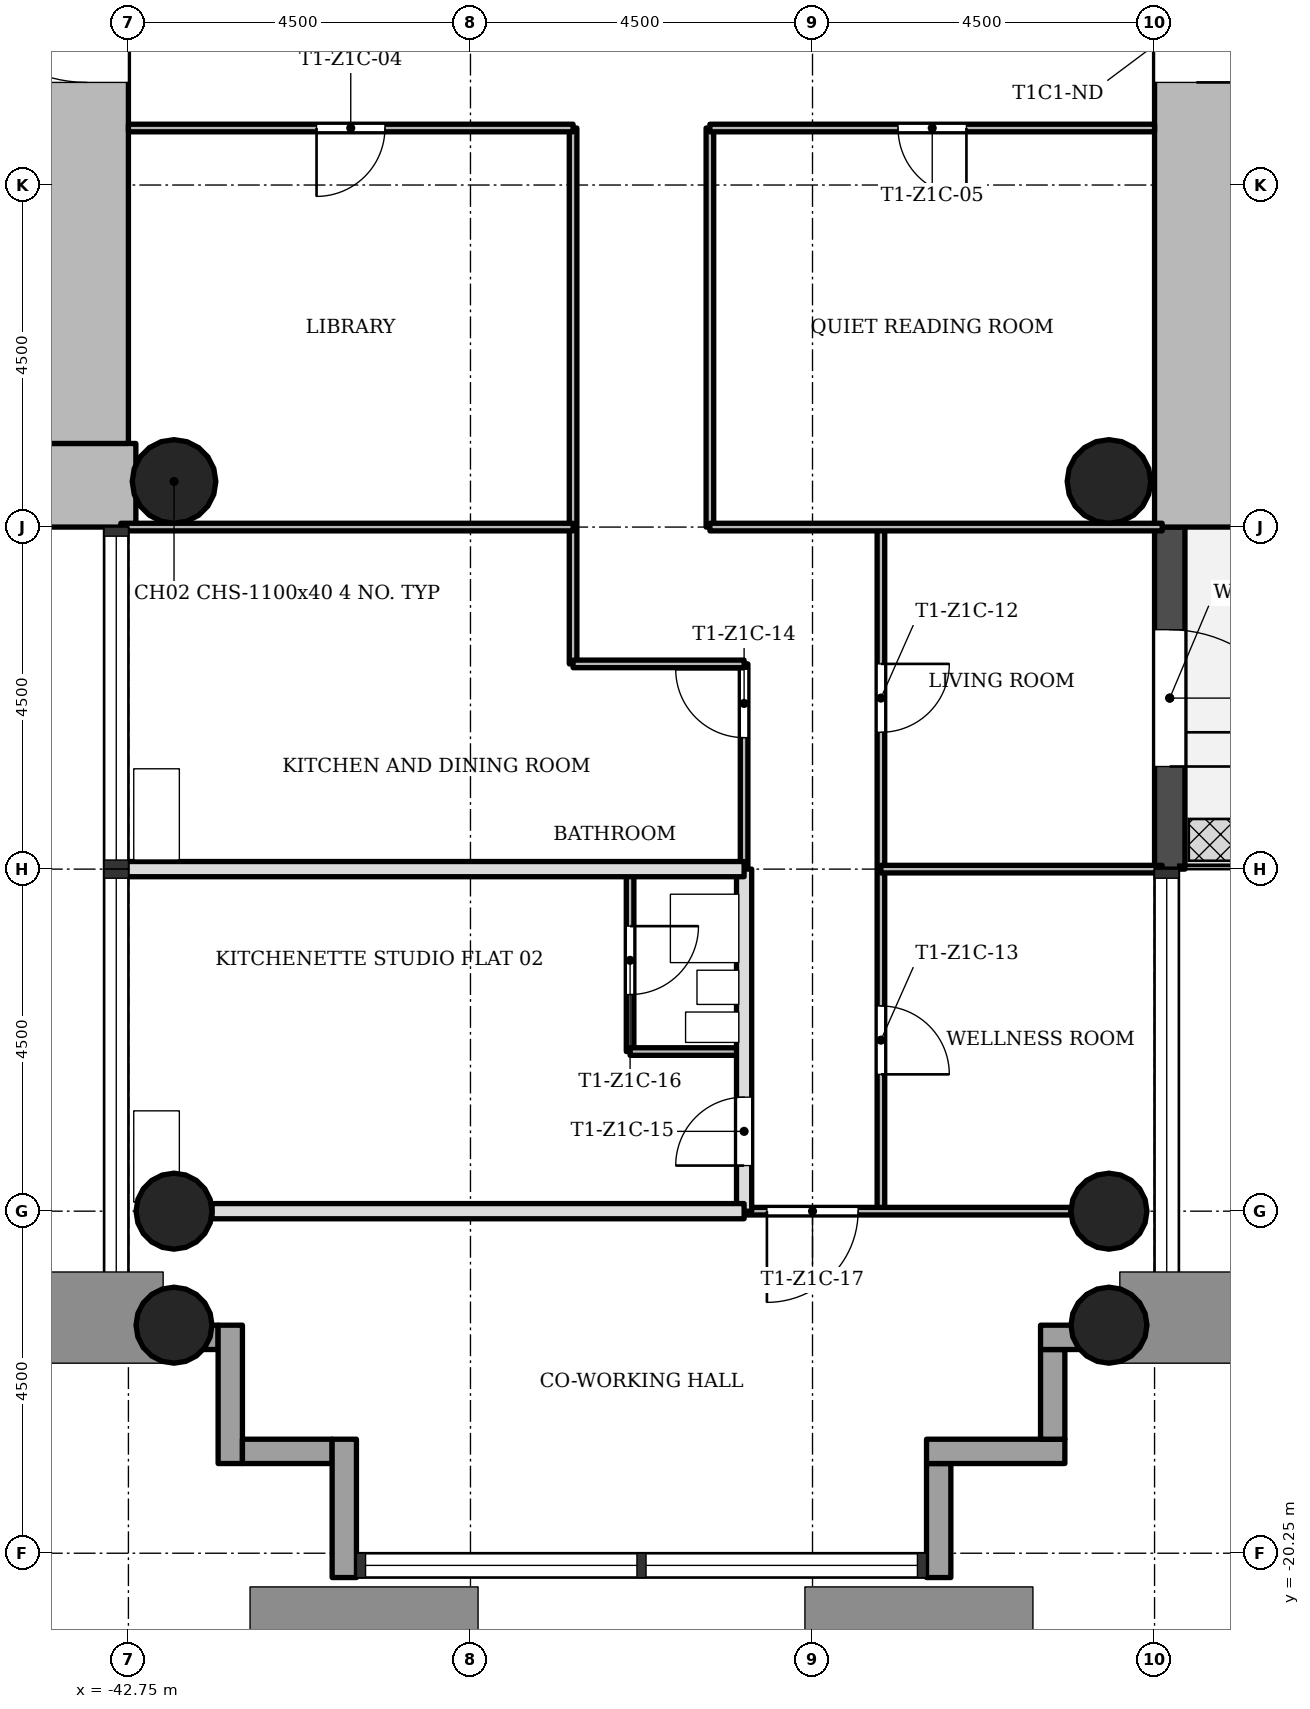
"""IFC4 building model, lengths in metres.
Left out: names, types, materials, properties, quantities, classifications, styles, units other than length and angle.
Written with IfcOpenShell. Run it as: python <this file> out.ifc"""

import sys

from ifc_helpers import new_model, si_unit, direction, frame, frame_2d, origin, origin_2d, place, context, subcontext, project, spatial, rectangle, hollow_circle, extrude, element, fill, save


model = new_model("IFC4")
c1 = context("Model", 3, precision=1e-05, world=origin(), true_north=direction((0.0, 1.0)))
c2 = subcontext(c1, "Body", "Model", "MODEL_VIEW")
j1 = project(units=[si_unit("LENGTHUNIT", "METRE"), si_unit("PLANEANGLEUNIT", "RADIAN")], contexts=[c1])
p1 = place(None, origin())
s1 = spatial("IfcSite", under=j1, at=p1, CompositionType="ELEMENT")
p2 = place(p1, origin())
s2 = spatial("IfcBuilding", under=s1, at=p2, CompositionType="ELEMENT")
p3 = place(p2, frame((0.0, 0.0, 44.9)))
s3 = spatial("IfcBuildingStorey", under=s2, at=p3, CompositionType="ELEMENT", Elevation=44.9)
p4 = place(p3, frame((-28.7, 5.65, 0.0), z_axis=(0.0, 0.0, 1.0), x_axis=(0.0, -1.0, 0.0)))
e1 = element("IfcWall", 1, at=p4, inside=s3, PredefinedType="SHEAR", context=c2, shape_type="SweptSolid", body=[
    extrude(rectangle(XDim=12.4, YDim=1.1, at=frame_2d((6.2, 0.0))), origin(), (0.0, 0.0, 1.0), 3.4),
])
p5 = place(p4, frame((4.75, 0.0, 0.0)))
e2 = element("IfcOpeningElement", 2, at=p5, cuts=e1, PredefinedType="OPENING", context=c2, shape_type="SweptSolid", body=[
    extrude(rectangle(XDim=1.8, YDim=2.1, at=frame_2d((0.9, 1.05))), frame((0.0, 0.56, 0.0), z_axis=(0.0, -1.0, 0.0), x_axis=(1.0, 0.0, 0.0)), (0.0, 0.0, 1.0), 1.12),
])
p6 = place(p3, frame((-50.65, -6.2, 0.0), z_axis=(0.0, 0.0, 1.0), x_axis=(1.0, 0.0, 0.0)))
e3 = element("IfcWall", 3, at=p6, inside=s3, PredefinedType="SHEAR", context=c2, shape_type="SweptSolid", body=[
    extrude(rectangle(XDim=7.998, YDim=1.1, at=frame_2d((3.999, 0.0))), origin(), (0.0, 0.0, 1.0), 3.4),
])
p7 = place(p3, frame((-43.3, -5.65, 0.0), z_axis=(0.0, 0.0, 1.0), x_axis=(0.0, 1.0, 0.0)))
e4 = element("IfcWall", 4, at=p7, inside=s3, PredefinedType="SHEAR", context=c2, shape_type="SweptSolid", body=[
    extrude(rectangle(XDim=12.4, YDim=1.1, at=frame_2d((6.2, 0.0))), origin(), (0.0, 0.0, 1.0), 3.4),
])
p8 = place(p7, frame((4.75, 0.0, 0.0)))
e5 = element("IfcOpeningElement", 5, at=p8, cuts=e4, PredefinedType="OPENING", context=c2, shape_type="SweptSolid", body=[
    extrude(rectangle(XDim=1.8, YDim=2.1, at=frame_2d((0.9, 1.05))), frame((0.0, 0.56, 0.0), z_axis=(0.0, -1.0, 0.0), x_axis=(1.0, 0.0, 0.0)), (0.0, 0.0, 1.0), 1.12),
])
for number, where, z_axis, x_axis in (
    (6, (-42.15, -15.75, 0.0), (0.0, 0.0, 1.0), (1.0, 0.0, 0.0)),
    (7, (-29.85, -15.75, 0.0), (0.0, 0.0, 1.0), (1.0, 0.0, 0.0)),
    (8, (-42.15, -17.25, 0.0), (0.0, 0.0, 1.0), (1.0, 0.0, 0.0)),
    (9, (-29.85, -17.25, 0.0), (0.0, 0.0, 1.0), (1.0, 0.0, 0.0)),
):
    element("IfcColumn", number, at=place(p3, frame(where, z_axis=z_axis, x_axis=x_axis)), inside=s3, PredefinedType="COLUMN", context=c2, shape_type="SweptSolid", body=[
        extrude(hollow_circle(Radius=0.5, WallThickness=0.036, at=origin_2d()), origin(), (0.0, 0.0, 1.0), 3.4),
    ])
for number, where, z_axis, x_axis in (
    (10, (-42.15, -6.15, 0.0), (0.0, 0.0, 1.0), (1.0, 0.0, 0.0)),
    (11, (-29.85, -6.15, 0.0), (0.0, 0.0, 1.0), (1.0, 0.0, 0.0)),
):
    element("IfcColumn", number, at=place(p3, frame(where, z_axis=z_axis, x_axis=x_axis)), inside=s3, PredefinedType="COLUMN", context=c2, shape_type="SweptSolid", body=[
        extrude(hollow_circle(Radius=0.55, WallThickness=0.04, at=origin_2d()), origin(), (0.0, 0.0, 1.0), 3.4),
    ])
p9 = place(p3, frame((-43.07, -17.41, -0.3), z_axis=(0.0, 0.0, 1.0), x_axis=(1.0, 0.0, 0.0)))
e12 = element("IfcWall", 12, at=p9, inside=s3, PredefinedType="STANDARD", context=c2, shape_type="SweptSolid", body=[
    extrude(rectangle(XDim=1.5, YDim=0.32, at=frame_2d((0.75, 0.0))), origin(), (0.0, 0.0, 1.0), 3.4),
])
p10 = place(p3, frame((-41.41, -17.25, -0.3), z_axis=(0.0, 0.0, 1.0), x_axis=(0.0, -1.0, 0.0)))
e13 = element("IfcWall", 13, at=p10, inside=s3, PredefinedType="STANDARD", context=c2, shape_type="SweptSolid", body=[
    extrude(rectangle(XDim=1.82, YDim=0.32, at=frame_2d((0.91, 0.0))), origin(), (0.0, 0.0, 1.0), 3.4),
])
p11 = place(p3, frame((-41.25, -18.91, -0.3), z_axis=(0.0, 0.0, 1.0), x_axis=(1.0, 0.0, 0.0)))
e14 = element("IfcWall", 14, at=p11, inside=s3, PredefinedType="STANDARD", context=c2, shape_type="SweptSolid", body=[
    extrude(rectangle(XDim=1.18, YDim=0.32, at=frame_2d((0.59, 0.0))), origin(), (0.0, 0.0, 1.0), 3.4),
])
p12 = place(p3, frame((-39.91, -18.75, -0.3), z_axis=(0.0, 0.0, 1.0), x_axis=(0.0, -1.0, 0.0)))
e15 = element("IfcWall", 15, at=p12, inside=s3, PredefinedType="STANDARD", context=c2, shape_type="SweptSolid", body=[
    extrude(rectangle(XDim=1.82, YDim=0.32, at=frame_2d((0.91, 0.0))), origin(), (0.0, 0.0, 1.0), 3.4),
])
p13 = place(p3, frame((-32.09, -20.57, -0.3), z_axis=(0.0, 0.0, 1.0), x_axis=(0.0, 1.0, 0.0)))
e16 = element("IfcWall", 16, at=p13, inside=s3, PredefinedType="STANDARD", context=c2, shape_type="SweptSolid", body=[
    extrude(rectangle(XDim=1.5, YDim=0.32, at=frame_2d((0.75, 0.0))), origin(), (0.0, 0.0, 1.0), 3.4),
])
p14 = place(p3, frame((-32.25, -18.91, -0.3), z_axis=(0.0, 0.0, 1.0), x_axis=(1.0, 0.0, 0.0)))
e17 = element("IfcWall", 17, at=p14, inside=s3, PredefinedType="STANDARD", context=c2, shape_type="SweptSolid", body=[
    extrude(rectangle(XDim=1.82, YDim=0.32, at=frame_2d((0.91, 0.0))), origin(), (0.0, 0.0, 1.0), 3.4),
])
p15 = place(p3, frame((-30.59, -18.75, -0.3), z_axis=(0.0, 0.0, 1.0), x_axis=(0.0, 1.0, 0.0)))
e18 = element("IfcWall", 18, at=p15, inside=s3, PredefinedType="STANDARD", context=c2, shape_type="SweptSolid", body=[
    extrude(rectangle(XDim=1.18, YDim=0.32, at=frame_2d((0.59, 0.0))), origin(), (0.0, 0.0, 1.0), 3.4),
])
p16 = place(p3, frame((-30.75, -17.41, -0.3), z_axis=(0.0, 0.0, 1.0), x_axis=(1.0, 0.0, 0.0)))
e19 = element("IfcWall", 19, at=p16, inside=s3, PredefinedType="STANDARD", context=c2, shape_type="SweptSolid", body=[
    extrude(rectangle(XDim=1.82, YDim=0.32, at=frame_2d((0.91, 0.0))), origin(), (0.0, 0.0, 1.0), 3.4),
])
p17 = place(p3, frame((-29.05, -11.25, -0.02), z_axis=(0.0, 0.0, 1.0), x_axis=(0.0, 1.0, 0.0)))
e20 = element("IfcWall", 20, at=p17, inside=s3, PredefinedType="STANDARD", context=c2, shape_type="SweptSolid", body=[
    extrude(rectangle(XDim=4.5, YDim=0.4, at=frame_2d((2.25, 0.0))), origin(), (0.0, 0.0, 1.0), 3.12),
])
p18 = place(p17, frame((1.35, 0.0, 0.02)))
e21 = element("IfcOpeningElement", 21, at=p18, cuts=e20, PredefinedType="OPENING", context=c2, shape_type="SweptSolid", body=[
    extrude(rectangle(XDim=1.8, YDim=2.1, at=frame_2d((0.9, 1.05))), frame((0.0, 0.21, 0.0), z_axis=(0.0, -1.0, 0.0), x_axis=(1.0, 0.0, 0.0)), (0.0, 0.0, 1.0), 0.42),
])
p19 = place(p3, frame((-36.9, -8.55, 0.0), z_axis=(0.0, 0.0, 1.0), x_axis=(0.0, 1.0, 0.0)))
e22 = element("IfcWall", 22, at=p19, inside=s3, PredefinedType="PARTITIONING", context=c2, shape_type="SweptSolid", body=[
    extrude(rectangle(XDim=7.05, YDim=0.1, at=frame_2d((3.525, 0.0))), origin(), (0.0, 0.0, 1.0), 3.0),
])
p20 = place(p3, frame((-36.15, -13.65, 0.0), z_axis=(0.0, 0.0, 1.0), x_axis=(0.0, 1.0, 0.0)))
e23 = element("IfcWall", 23, at=p20, inside=s3, PredefinedType="PARTITIONING", context=c2, shape_type="SweptSolid", body=[
    extrude(rectangle(XDim=2.4, YDim=0.1, at=frame_2d((1.2, 0.0))), origin(), (0.0, 0.0, 1.0), 3.0),
])
p21 = place(p20, frame((0.75, 0.0, 0.0)))
e24 = element("IfcOpeningElement", 24, at=p21, cuts=e23, PredefinedType="OPENING", context=c2, shape_type="SweptSolid", body=[
    extrude(rectangle(XDim=0.9, YDim=2.1, at=frame_2d((0.45, 1.05))), frame((0.0, 0.06, 0.0), z_axis=(0.0, -1.0, 0.0), x_axis=(1.0, 0.0, 0.0)), (0.0, 0.0, 1.0), 0.12),
])
p22 = place(p3, frame((-35.1, -6.75, 0.0), z_axis=(0.0, 0.0, 1.0), x_axis=(0.0, 1.0, 0.0)))
e25 = element("IfcWall", 25, at=p22, inside=s3, PredefinedType="PARTITIONING", context=c2, shape_type="SweptSolid", body=[
    extrude(rectangle(XDim=5.25, YDim=0.1, at=frame_2d((2.625, 0.0))), origin(), (0.0, 0.0, 1.0), 3.0),
])
p23 = place(p3, frame((-34.65, -11.25, 0.0), z_axis=(0.0, 0.0, 1.0), x_axis=(0.0, 1.0, 0.0)))
e26 = element("IfcWall", 26, at=p23, inside=s3, PredefinedType="PARTITIONING", context=c2, shape_type="SweptSolid", body=[
    extrude(rectangle(XDim=2.7, YDim=0.1, at=frame_2d((1.35, 0.0))), origin(), (0.0, 0.0, 1.0), 3.0),
])
p24 = place(p23, frame((1.73, 0.0, 0.0)))
e27 = element("IfcOpeningElement", 27, at=p24, cuts=e26, PredefinedType="OPENING", context=c2, shape_type="SweptSolid", body=[
    extrude(rectangle(XDim=0.9, YDim=2.1, at=frame_2d((0.45, 1.05))), frame((0.0, 0.06, 0.0), z_axis=(0.0, -1.0, 0.0), x_axis=(1.0, 0.0, 0.0)), (0.0, 0.0, 1.0), 0.12),
])
p25 = place(p3, frame((-34.65, -15.75, 0.0), z_axis=(0.0, 0.0, 1.0), x_axis=(0.0, 1.0, 0.0)))
e28 = element("IfcWall", 28, at=p25, inside=s3, PredefinedType="SOLIDWALL", context=c2, shape_type="SweptSolid", body=[
    extrude(rectangle(XDim=4.5, YDim=0.2, at=frame_2d((2.25, 0.0))), origin(), (0.0, 0.0, 1.0), 3.0),
])
p26 = place(p25, frame((0.6, 0.0, 0.0)))
e29 = element("IfcOpeningElement", 29, at=p26, cuts=e28, PredefinedType="OPENING", context=c2, shape_type="SweptSolid", body=[
    extrude(rectangle(XDim=0.9, YDim=2.1, at=frame_2d((0.45, 1.05))), frame((0.0, 0.11, 0.0), z_axis=(0.0, -1.0, 0.0), x_axis=(1.0, 0.0, 0.0)), (0.0, 0.0, 1.0), 0.22),
])
p27 = place(p3, frame((-32.85, -15.75, 0.0), z_axis=(0.0, 0.0, 1.0), x_axis=(0.0, 1.0, 0.0)))
e30 = element("IfcWall", 30, at=p27, inside=s3, PredefinedType="PARTITIONING", context=c2, shape_type="SweptSolid", body=[
    extrude(rectangle(XDim=9.0, YDim=0.1, at=frame_2d((4.5, 0.0))), origin(), (0.0, 0.0, 1.0), 3.0),
])
p28 = place(p27, frame((6.3, 0.0, 0.0)))
e31 = element("IfcOpeningElement", 31, at=p28, cuts=e30, PredefinedType="OPENING", context=c2, shape_type="SweptSolid", body=[
    extrude(rectangle(XDim=0.9, YDim=2.1, at=frame_2d((0.45, 1.05))), frame((0.0, 0.06, 0.0), z_axis=(0.0, -1.0, 0.0), x_axis=(1.0, 0.0, 0.0)), (0.0, 0.0, 1.0), 0.12),
])
p29 = place(p27, frame((1.8, 0.0, 0.0)))
e32 = element("IfcOpeningElement", 32, at=p29, cuts=e30, PredefinedType="OPENING", context=c2, shape_type="SweptSolid", body=[
    extrude(rectangle(XDim=0.9, YDim=2.1, at=frame_2d((0.45, 1.05))), frame((0.0, 0.06, 0.0), z_axis=(0.0, -1.0, 0.0), x_axis=(1.0, 0.0, 0.0)), (0.0, 0.0, 1.0), 0.12),
])
p30 = place(p3, frame((-34.65, -15.75, 0.0), z_axis=(0.0, 0.0, 1.0), x_axis=(1.0, 0.0, 0.0)))
e33 = element("IfcWall", 33, at=p30, inside=s3, PredefinedType="PARTITIONING", context=c2, shape_type="SweptSolid", body=[
    extrude(rectangle(XDim=4.3, YDim=0.1, at=frame_2d((2.15, 0.0))), origin(), (0.0, 0.0, 1.0), 3.0),
])
p31 = place(p30, frame((0.3, 0.0, 0.0)))
e34 = element("IfcOpeningElement", 34, at=p31, cuts=e33, PredefinedType="OPENING", context=c2, shape_type="SweptSolid", body=[
    extrude(rectangle(XDim=1.2, YDim=2.1, at=frame_2d((0.6, 1.05))), frame((0.0, 0.06, 0.0), z_axis=(0.0, -1.0, 0.0), x_axis=(1.0, 0.0, 0.0)), (0.0, 0.0, 1.0), 0.12),
])
p32 = place(p3, frame((-41.65, -15.75, 0.0), z_axis=(0.0, 0.0, 1.0), x_axis=(1.0, 0.0, 0.0)))
e35 = element("IfcWall", 35, at=p32, inside=s3, PredefinedType="SOLIDWALL", context=c2, shape_type="SweptSolid", body=[
    extrude(rectangle(XDim=7.0, YDim=0.2, at=frame_2d((3.5, 0.0))), origin(), (0.0, 0.0, 1.0), 3.0),
])
p33 = place(p3, frame((-36.15, -13.65, 0.0), z_axis=(0.0, 0.0, 1.0), x_axis=(1.0, 0.0, 0.0)))
e36 = element("IfcWall", 36, at=p33, inside=s3, PredefinedType="PARTITIONING", context=c2, shape_type="SweptSolid", body=[
    extrude(rectangle(XDim=1.5, YDim=0.1, at=frame_2d((0.75, 0.0))), origin(), (0.0, 0.0, 1.0), 3.0),
])
p34 = place(p3, frame((-32.85, -11.25, 0.0), z_axis=(0.0, 0.0, 1.0), x_axis=(1.0, 0.0, 0.0)))
e37 = element("IfcWall", 37, at=p34, inside=s3, PredefinedType="PARTITIONING", context=c2, shape_type="SweptSolid", body=[
    extrude(rectangle(XDim=3.7, YDim=0.1, at=frame_2d((1.85, 0.0))), origin(), (0.0, 0.0, 1.0), 3.0),
])
p35 = place(p3, frame((-42.85, -11.25, 0.0), z_axis=(0.0, 0.0, 1.0), x_axis=(1.0, 0.0, 0.0)))
e38 = element("IfcWall", 38, at=p35, inside=s3, PredefinedType="SOLIDWALL", context=c2, shape_type="SweptSolid", body=[
    extrude(rectangle(XDim=8.2, YDim=0.2, at=frame_2d((4.1, 0.0))), origin(), (0.0, 0.0, 1.0), 3.0),
])
p36 = place(p3, frame((-36.9, -8.55, 0.0), z_axis=(0.0, 0.0, 1.0), x_axis=(1.0, 0.0, 0.0)))
e39 = element("IfcWall", 39, at=p36, inside=s3, PredefinedType="PARTITIONING", context=c2, shape_type="SweptSolid", body=[
    extrude(rectangle(XDim=2.25, YDim=0.1, at=frame_2d((1.125, 0.0))), origin(), (0.0, 0.0, 1.0), 3.0),
])
for number, where, z_axis, x_axis in (
    (40, (-42.85, -6.75, 0.0), (0.0, 0.0, 1.0), (1.0, 0.0, 0.0)),
    (41, (-35.1, -6.75, 0.0), (0.0, 0.0, 1.0), (1.0, 0.0, 0.0)),
):
    element("IfcWall", number, at=place(p3, frame(where, z_axis=z_axis, x_axis=x_axis)), inside=s3, PredefinedType="PARTITIONING", context=c2, shape_type="SweptSolid", body=[
        extrude(rectangle(XDim=5.95, YDim=0.1, at=frame_2d((2.975, 0.0))), origin(), (0.0, 0.0, 1.0), 3.0),
    ])
p37 = place(p3, frame((-42.75, -1.5, 0.0), z_axis=(0.0, 0.0, 1.0), x_axis=(1.0, 0.0, 0.0)))
e42 = element("IfcWall", 42, at=p37, inside=s3, PredefinedType="PARTITIONING", context=c2, shape_type="SweptSolid", body=[
    extrude(rectangle(XDim=5.85, YDim=0.1, at=frame_2d((2.925, 0.0))), origin(), (0.0, 0.0, 1.0), 3.0),
])
p38 = place(p37, frame((2.475, 0.0, 0.0)))
e43 = element("IfcOpeningElement", 43, at=p38, cuts=e42, PredefinedType="OPENING", context=c2, shape_type="SweptSolid", body=[
    extrude(rectangle(XDim=0.9, YDim=2.1, at=frame_2d((0.45, 1.05))), frame((0.0, 0.06, 0.0), z_axis=(0.0, -1.0, 0.0), x_axis=(1.0, 0.0, 0.0)), (0.0, 0.0, 1.0), 0.12),
])
p39 = place(p3, frame((-35.1, -1.5, 0.0), z_axis=(0.0, 0.0, 1.0), x_axis=(1.0, 0.0, 0.0)))
e44 = element("IfcWall", 44, at=p39, inside=s3, PredefinedType="PARTITIONING", context=c2, shape_type="SweptSolid", body=[
    extrude(rectangle(XDim=5.85, YDim=0.1, at=frame_2d((2.925, 0.0))), origin(), (0.0, 0.0, 1.0), 3.0),
])
p40 = place(p39, frame((2.475, 0.0, 0.0)))
e45 = element("IfcOpeningElement", 45, at=p40, cuts=e44, PredefinedType="OPENING", context=c2, shape_type="SweptSolid", body=[
    extrude(rectangle(XDim=0.9, YDim=2.1, at=frame_2d((0.45, 1.05))), frame((0.0, 0.06, 0.0), z_axis=(0.0, -1.0, 0.0), x_axis=(1.0, 0.0, 0.0)), (0.0, 0.0, 1.0), 0.12),
])
p41 = place(p18, origin())
e46 = element("IfcDoor", 46, at=p41, inside=s3, OperationType="SINGLE_SWING_LEFT", PredefinedType="DOOR", context=c2, shape_type="SweptSolid", body=[
    extrude(rectangle(XDim=1.8, YDim=2.1, at=frame_2d((0.9, 1.05))), frame((0.0, 0.025, 0.0), z_axis=(0.0, -1.0, 0.0), x_axis=(1.0, 0.0, 0.0)), (0.0, 0.0, 1.0), 0.05),
])
fill(e21, e46)
p42 = place(p38, origin())
e47 = element("IfcDoor", 47, at=p42, inside=s3, OperationType="SINGLE_SWING_LEFT", PredefinedType="DOOR", context=c2, shape_type="SweptSolid", body=[
    extrude(rectangle(XDim=0.9, YDim=2.1, at=frame_2d((0.45, 1.05))), frame((0.0, 0.025, 0.0), z_axis=(0.0, -1.0, 0.0), x_axis=(1.0, 0.0, 0.0)), (0.0, 0.0, 1.0), 0.05),
])
fill(e43, e47)
p43 = place(p40, origin())
e48 = element("IfcDoor", 48, at=p43, inside=s3, OperationType="SINGLE_SWING_RIGHT", PredefinedType="DOOR", context=c2, shape_type="SweptSolid", body=[
    extrude(rectangle(XDim=0.9, YDim=2.1, at=frame_2d((0.45, 1.05))), frame((0.0, 0.025, 0.0), z_axis=(0.0, -1.0, 0.0), x_axis=(1.0, 0.0, 0.0)), (0.0, 0.0, 1.0), 0.05),
])
fill(e45, e48)
p44 = place(p28, origin())
e49 = element("IfcDoor", 49, at=p44, inside=s3, OperationType="SINGLE_SWING_RIGHT", PredefinedType="DOOR", context=c2, shape_type="SweptSolid", body=[
    extrude(rectangle(XDim=0.9, YDim=2.1, at=frame_2d((0.45, 1.05))), frame((0.0, 0.025, 0.0), z_axis=(0.0, -1.0, 0.0), x_axis=(1.0, 0.0, 0.0)), (0.0, 0.0, 1.0), 0.05),
])
fill(e31, e49)
p45 = place(p29, origin())
e50 = element("IfcDoor", 50, at=p45, inside=s3, OperationType="SINGLE_SWING_LEFT", PredefinedType="DOOR", context=c2, shape_type="SweptSolid", body=[
    extrude(rectangle(XDim=0.9, YDim=2.1, at=frame_2d((0.45, 1.05))), frame((0.0, 0.025, 0.0), z_axis=(0.0, -1.0, 0.0), x_axis=(1.0, 0.0, 0.0)), (0.0, 0.0, 1.0), 0.05),
])
fill(e32, e50)
p46 = place(p24, origin())
e51 = element("IfcDoor", 51, at=p46, inside=s3, OperationType="SINGLE_SWING_LEFT", PredefinedType="DOOR", context=c2, shape_type="SweptSolid", body=[
    extrude(rectangle(XDim=0.9, YDim=2.1, at=frame_2d((0.45, 1.05))), frame((0.0, 0.025, 0.0), z_axis=(0.0, -1.0, 0.0), x_axis=(1.0, 0.0, 0.0)), (0.0, 0.0, 1.0), 0.05),
])
fill(e27, e51)
p47 = place(p26, origin())
e52 = element("IfcDoor", 52, at=p47, inside=s3, OperationType="SINGLE_SWING_RIGHT", PredefinedType="DOOR", context=c2, shape_type="SweptSolid", body=[
    extrude(rectangle(XDim=0.9, YDim=2.1, at=frame_2d((0.45, 1.05))), frame((0.0, 0.025, 0.0), z_axis=(0.0, -1.0, 0.0), x_axis=(1.0, 0.0, 0.0)), (0.0, 0.0, 1.0), 0.05),
])
fill(e29, e52)
p48 = place(p21, origin())
e53 = element("IfcDoor", 53, at=p48, inside=s3, OperationType="SINGLE_SWING_RIGHT", PredefinedType="DOOR", context=c2, shape_type="SweptSolid", body=[
    extrude(rectangle(XDim=0.9, YDim=2.1, at=frame_2d((0.45, 1.05))), frame((0.0, 0.025, 0.0), z_axis=(0.0, -1.0, 0.0), x_axis=(1.0, 0.0, 0.0)), (0.0, 0.0, 1.0), 0.05),
])
fill(e24, e53)
p49 = place(p31, origin())
e54 = element("IfcDoor", 54, at=p49, inside=s3, OperationType="SINGLE_SWING_LEFT", PredefinedType="DOOR", context=c2, shape_type="SweptSolid", body=[
    extrude(rectangle(XDim=1.2, YDim=2.1, at=frame_2d((0.6, 1.05))), frame((0.0, 0.025, 0.0), z_axis=(0.0, -1.0, 0.0), x_axis=(1.0, 0.0, 0.0)), (0.0, 0.0, 1.0), 0.05),
])
fill(e34, e54)
p50 = place(p5, origin())
e55 = element("IfcDoor", 55, at=p50, inside=s3, OperationType="SINGLE_SWING_LEFT", PredefinedType="DOOR", context=c2, shape_type="SweptSolid", body=[
    extrude(rectangle(XDim=1.8, YDim=2.1, at=frame_2d((0.9, 1.05))), frame((0.0, 0.025, 0.0), z_axis=(0.0, -1.0, 0.0), x_axis=(1.0, 0.0, 0.0)), (0.0, 0.0, 1.0), 0.05),
])
fill(e2, e55)
p51 = place(p8, origin())
e56 = element("IfcDoor", 56, at=p51, inside=s3, OperationType="SINGLE_SWING_LEFT", PredefinedType="DOOR", context=c2, shape_type="SweptSolid", body=[
    extrude(rectangle(XDim=1.8, YDim=2.1, at=frame_2d((0.9, 1.05))), frame((0.0, 0.025, 0.0), z_axis=(0.0, -1.0, 0.0), x_axis=(1.0, 0.0, 0.0)), (0.0, 0.0, 1.0), 0.05),
])
fill(e5, e56)
save(model, sys.argv[1])
